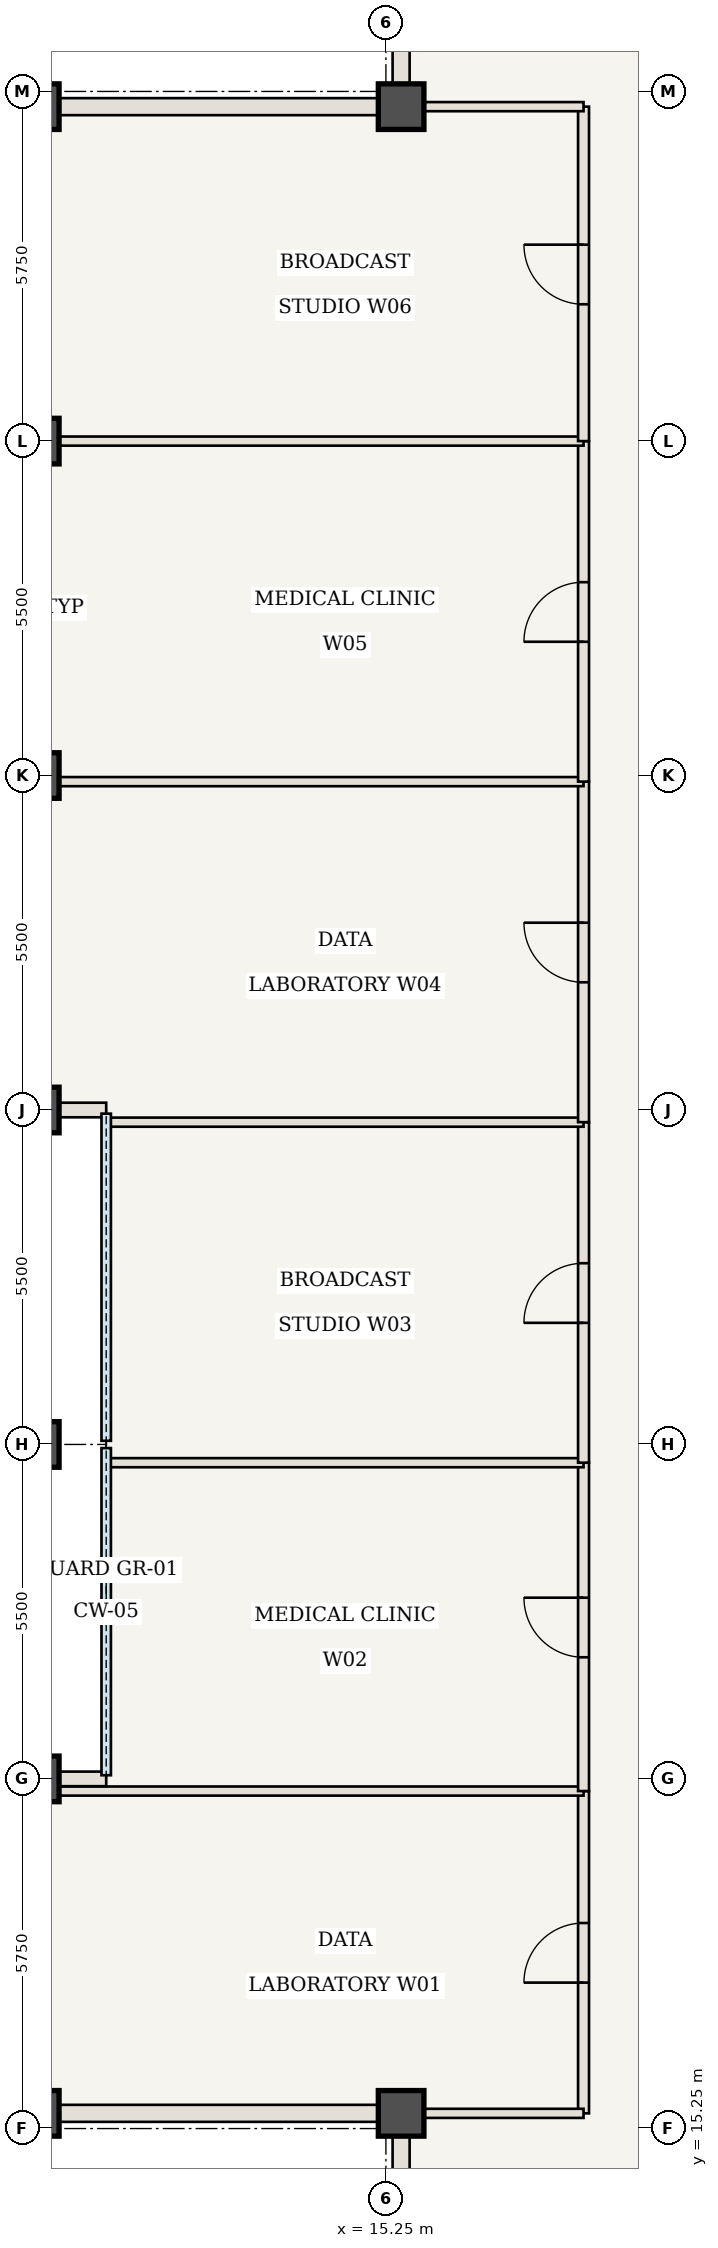
"""IFC4 building model, lengths in metres.
Left out: names, types, materials, properties, quantities, classifications, styles, units other than length and angle.
Written with IfcOpenShell. Run it as: python <this file> out.ifc"""

import sys

from ifc_helpers import new_model, si_unit, direction, frame, frame_2d, origin, origin_2d, place, context, subcontext, project, spatial, rectangle, extrude, element, fill, save


model = new_model("IFC4")
c1 = context("Model", 3, precision=1e-05, world=origin(), true_north=direction((0.0, 1.0)))
c2 = subcontext(c1, "Body", "Model", "MODEL_VIEW")
j1 = project(units=[si_unit("LENGTHUNIT", "METRE"), si_unit("PLANEANGLEUNIT", "RADIAN")], contexts=[c1])
p1 = place(None, origin())
s1 = spatial("IfcSite", under=j1, at=p1, CompositionType="ELEMENT")
p2 = place(p1, origin())
s2 = spatial("IfcBuilding", under=s1, at=p2, CompositionType="ELEMENT")
p3 = place(p2, frame((0.0, 0.0, 296.8)))
s3 = spatial("IfcBuildingStorey", under=s2, at=p3, CompositionType="ELEMENT", Elevation=296.8)
for number, where, z_axis, x_axis in (
    (1, (15.5, 15.5, 0.0), (0.0, 0.0, 1.0), (1.0, 0.0, 0.0)),
    (2, (9.5, 15.5, 0.0), (0.0, 0.0, 1.0), (1.0, 0.0, 0.0)),
    (3, (15.5, 48.5, 0.0), (0.0, 0.0, 1.0), (1.0, 0.0, 0.0)),
    (4, (9.5, 48.5, 0.0), (0.0, 0.0, 1.0), (1.0, 0.0, 0.0)),
    (5, (9.5, 21.0, 0.0), (0.0, 0.0, 1.0), (1.0, 0.0, 0.0)),
    (6, (9.5, 26.5, 0.0), (0.0, 0.0, 1.0), (1.0, 0.0, 0.0)),
    (7, (9.5, 32.0, 0.0), (0.0, 0.0, 1.0), (1.0, 0.0, 0.0)),
    (8, (9.5, 37.5, 0.0), (0.0, 0.0, 1.0), (1.0, 0.0, 0.0)),
    (9, (9.5, 43.0, 0.0), (0.0, 0.0, 1.0), (1.0, 0.0, 0.0)),
):
    element("IfcColumn", number, at=place(p3, frame(where, z_axis=z_axis, x_axis=x_axis)), inside=s3, PredefinedType="COLUMN", context=c2, shape_type="SweptSolid", body=[
        extrude(rectangle(XDim=0.75, YDim=0.75, at=origin_2d()), origin(), (0.0, 0.0, 1.0), 3.85),
    ])
p4 = place(p3, frame((18.5, 15.5, 0.0), z_axis=(0.0, 0.0, 1.0), x_axis=(0.0, 1.0, 0.0)))
e10 = element("IfcWall", 10, at=p4, inside=s3, PredefinedType="STANDARD", context=c2, shape_type="SweptSolid", body=[
    extrude(rectangle(XDim=5.3, YDim=0.18, at=frame_2d((2.65, 0.0))), origin(), (0.0, 0.0, 1.0), 3.685),
])
p5 = place(p4, frame((2.15, 0.0, 0.0)))
e11 = element("IfcOpeningElement", 11, at=p5, cuts=e10, PredefinedType="OPENING", context=c2, shape_type="SweptSolid", body=[
    extrude(rectangle(XDim=0.98, YDim=2.2, at=frame_2d((0.49, 1.1))), frame((0.0, 0.1, 0.0), z_axis=(0.0, -1.0, 0.0), x_axis=(1.0, 0.0, 0.0)), (0.0, 0.0, 1.0), 0.2),
])
p6 = place(p3, frame((9.56, 20.8, 0.0), z_axis=(0.0, 0.0, 1.0), x_axis=(1.0, 0.0, 0.0)))
e12 = element("IfcWall", 12, at=p6, inside=s3, PredefinedType="STANDARD", context=c2, shape_type="SweptSolid", body=[
    extrude(rectangle(XDim=8.94, YDim=0.15, at=frame_2d((4.47, 0.0))), origin(), (0.0, 0.0, 1.0), 3.14),
])
p7 = place(p3, frame((18.5, 20.8, 0.0), z_axis=(0.0, 0.0, 1.0), x_axis=(0.0, 1.0, 0.0)))
e13 = element("IfcWall", 13, at=p7, inside=s3, PredefinedType="STANDARD", context=c2, shape_type="SweptSolid", body=[
    extrude(rectangle(XDim=5.4, YDim=0.18, at=frame_2d((2.7, 0.0))), origin(), (0.0, 0.0, 1.0), 3.685),
])
p8 = place(p7, frame((2.2, 0.0, 0.0)))
e14 = element("IfcOpeningElement", 14, at=p8, cuts=e13, PredefinedType="OPENING", context=c2, shape_type="SweptSolid", body=[
    extrude(rectangle(XDim=0.98, YDim=2.2, at=frame_2d((0.49, 1.1))), frame((0.0, 0.1, 0.0), z_axis=(0.0, -1.0, 0.0), x_axis=(1.0, 0.0, 0.0)), (0.0, 0.0, 1.0), 0.2),
])
p9 = place(p3, frame((10.66, 26.2, 0.0), z_axis=(0.0, 0.0, 1.0), x_axis=(1.0, 0.0, 0.0)))
e15 = element("IfcWall", 15, at=p9, inside=s3, PredefinedType="STANDARD", context=c2, shape_type="SweptSolid", body=[
    extrude(rectangle(XDim=7.84, YDim=0.15, at=frame_2d((3.92, 0.0))), origin(), (0.0, 0.0, 1.0), 3.685),
])
p10 = place(p3, frame((18.5, 26.2, 0.0), z_axis=(0.0, 0.0, 1.0), x_axis=(0.0, 1.0, 0.0)))
e16 = element("IfcWall", 16, at=p10, inside=s3, PredefinedType="STANDARD", context=c2, shape_type="SweptSolid", body=[
    extrude(rectangle(XDim=5.6, YDim=0.18, at=frame_2d((2.8, 0.0))), origin(), (0.0, 0.0, 1.0), 3.685),
])
p11 = place(p10, frame((2.3, 0.0, 0.0)))
e17 = element("IfcOpeningElement", 17, at=p11, cuts=e16, PredefinedType="OPENING", context=c2, shape_type="SweptSolid", body=[
    extrude(rectangle(XDim=0.98, YDim=2.2, at=frame_2d((0.49, 1.1))), frame((0.0, 0.1, 0.0), z_axis=(0.0, -1.0, 0.0), x_axis=(1.0, 0.0, 0.0)), (0.0, 0.0, 1.0), 0.2),
])
p12 = place(p3, frame((10.66, 31.8, 0.0), z_axis=(0.0, 0.0, 1.0), x_axis=(1.0, 0.0, 0.0)))
e18 = element("IfcWall", 18, at=p12, inside=s3, PredefinedType="STANDARD", context=c2, shape_type="SweptSolid", body=[
    extrude(rectangle(XDim=7.84, YDim=0.15, at=frame_2d((3.92, 0.0))), origin(), (0.0, 0.0, 1.0), 3.14),
])
p13 = place(p3, frame((18.5, 31.8, 0.0), z_axis=(0.0, 0.0, 1.0), x_axis=(0.0, 1.0, 0.0)))
e19 = element("IfcWall", 19, at=p13, inside=s3, PredefinedType="STANDARD", context=c2, shape_type="SweptSolid", body=[
    extrude(rectangle(XDim=5.6, YDim=0.18, at=frame_2d((2.8, 0.0))), origin(), (0.0, 0.0, 1.0), 3.685),
])
p14 = place(p13, frame((2.3, 0.0, 0.0)))
e20 = element("IfcOpeningElement", 20, at=p14, cuts=e19, PredefinedType="OPENING", context=c2, shape_type="SweptSolid", body=[
    extrude(rectangle(XDim=0.98, YDim=2.2, at=frame_2d((0.49, 1.1))), frame((0.0, 0.1, 0.0), z_axis=(0.0, -1.0, 0.0), x_axis=(1.0, 0.0, 0.0)), (0.0, 0.0, 1.0), 0.2),
])
p15 = place(p3, frame((9.56, 37.4, 0.0), z_axis=(0.0, 0.0, 1.0), x_axis=(1.0, 0.0, 0.0)))
e21 = element("IfcWall", 21, at=p15, inside=s3, PredefinedType="STANDARD", context=c2, shape_type="SweptSolid", body=[
    extrude(rectangle(XDim=8.94, YDim=0.15, at=frame_2d((4.47, 0.0))), origin(), (0.0, 0.0, 1.0), 3.685),
])
p16 = place(p3, frame((18.5, 37.4, 0.0), z_axis=(0.0, 0.0, 1.0), x_axis=(0.0, 1.0, 0.0)))
e22 = element("IfcWall", 22, at=p16, inside=s3, PredefinedType="STANDARD", context=c2, shape_type="SweptSolid", body=[
    extrude(rectangle(XDim=5.6, YDim=0.18, at=frame_2d((2.8, 0.0))), origin(), (0.0, 0.0, 1.0), 3.685),
])
p17 = place(p16, frame((2.3, 0.0, 0.0)))
e23 = element("IfcOpeningElement", 23, at=p17, cuts=e22, PredefinedType="OPENING", context=c2, shape_type="SweptSolid", body=[
    extrude(rectangle(XDim=0.98, YDim=2.2, at=frame_2d((0.49, 1.1))), frame((0.0, 0.1, 0.0), z_axis=(0.0, -1.0, 0.0), x_axis=(1.0, 0.0, 0.0)), (0.0, 0.0, 1.0), 0.2),
])
p18 = place(p3, frame((9.56, 43.0, 0.0), z_axis=(0.0, 0.0, 1.0), x_axis=(1.0, 0.0, 0.0)))
e24 = element("IfcWall", 24, at=p18, inside=s3, PredefinedType="STANDARD", context=c2, shape_type="SweptSolid", body=[
    extrude(rectangle(XDim=8.94, YDim=0.15, at=frame_2d((4.47, 0.0))), origin(), (0.0, 0.0, 1.0), 3.685),
])
p19 = place(p3, frame((18.5, 43.0, 0.0), z_axis=(0.0, 0.0, 1.0), x_axis=(0.0, 1.0, 0.0)))
e25 = element("IfcWall", 25, at=p19, inside=s3, PredefinedType="STANDARD", context=c2, shape_type="SweptSolid", body=[
    extrude(rectangle(XDim=5.5, YDim=0.18, at=frame_2d((2.75, 0.0))), origin(), (0.0, 0.0, 1.0), 3.685),
])
p20 = place(p19, frame((2.25, 0.0, 0.0)))
e26 = element("IfcOpeningElement", 26, at=p20, cuts=e25, PredefinedType="OPENING", context=c2, shape_type="SweptSolid", body=[
    extrude(rectangle(XDim=0.98, YDim=2.2, at=frame_2d((0.49, 1.1))), frame((0.0, 0.1, 0.0), z_axis=(0.0, -1.0, 0.0), x_axis=(1.0, 0.0, 0.0)), (0.0, 0.0, 1.0), 0.2),
])
for number, where, z_axis, x_axis in (
    (27, (15.5, 15.5, 0.0), (0.0, 0.0, 1.0), (1.0, 0.0, 0.0)),
    (28, (15.5, 48.5, 0.0), (0.0, 0.0, 1.0), (1.0, 0.0, 0.0)),
):
    element("IfcWall", number, at=place(p3, frame(where, z_axis=z_axis, x_axis=x_axis)), inside=s3, PredefinedType="STANDARD", context=c2, shape_type="SweptSolid", body=[
        extrude(rectangle(XDim=3.0, YDim=0.15, at=frame_2d((1.5, 0.0))), origin(), (0.0, 0.0, 1.0), 3.685),
    ])
for number, where, z_axis, x_axis in (
    (29, (9.5, 21.0, 0.0), (0.0, 0.0, 1.0), (1.0, 0.0, 0.0)),
    (30, (9.5, 32.0, 0.0), (0.0, 0.0, 1.0), (1.0, 0.0, 0.0)),
):
    element("IfcWall", number, at=place(p3, frame(where, z_axis=z_axis, x_axis=x_axis)), inside=s3, PredefinedType="USERDEFINED", context=c2, shape_type="SweptSolid", body=[
        extrude(rectangle(XDim=1.15, YDim=0.24, at=frame_2d((0.575, 0.0))), origin(), (0.0, 0.0, 1.0), 2.985),
    ])
for number, where, z_axis, x_axis in (
    (31, (15.5, 9.5, 0.0), (0.0, 0.0, 1.0), (0.0, 1.0, 0.0)),
    (32, (15.5, 15.5, 0.0), (0.0, 0.0, 1.0), (-1.0, 0.0, 0.0)),
    (33, (15.5, 48.5, 0.0), (0.0, 0.0, 1.0), (0.0, 1.0, 0.0)),
    (34, (9.5, 48.5, 0.0), (0.0, 0.0, 1.0), (1.0, 0.0, 0.0)),
):
    element("IfcWall", number, at=place(p3, frame(where, z_axis=z_axis, x_axis=x_axis)), inside=s3, PredefinedType="USERDEFINED", context=c2, shape_type="SweptSolid", body=[
        extrude(rectangle(XDim=6.0, YDim=0.28, at=frame_2d((3.0, 0.0))), origin(), (0.0, 0.0, 1.0), 2.985),
    ])
p21 = place(p5, origin())
e35 = element("IfcDoor", 35, at=p21, inside=s3, OperationType="SINGLE_SWING_LEFT", PredefinedType="DOOR", context=c2, shape_type="SweptSolid", body=[
    extrude(rectangle(XDim=0.98, YDim=2.2, at=frame_2d((0.49, 1.1))), frame((0.0, 0.025, 0.0), z_axis=(0.0, -1.0, 0.0), x_axis=(1.0, 0.0, 0.0)), (0.0, 0.0, 1.0), 0.05),
])
fill(e11, e35)
p22 = place(p8, origin())
e36 = element("IfcDoor", 36, at=p22, inside=s3, OperationType="SINGLE_SWING_RIGHT", PredefinedType="DOOR", context=c2, shape_type="SweptSolid", body=[
    extrude(rectangle(XDim=0.98, YDim=2.2, at=frame_2d((0.49, 1.1))), frame((0.0, 0.025, 0.0), z_axis=(0.0, -1.0, 0.0), x_axis=(1.0, 0.0, 0.0)), (0.0, 0.0, 1.0), 0.05),
])
fill(e14, e36)
p23 = place(p11, origin())
e37 = element("IfcDoor", 37, at=p23, inside=s3, OperationType="SINGLE_SWING_LEFT", PredefinedType="DOOR", context=c2, shape_type="SweptSolid", body=[
    extrude(rectangle(XDim=0.98, YDim=2.2, at=frame_2d((0.49, 1.1))), frame((0.0, 0.025, 0.0), z_axis=(0.0, -1.0, 0.0), x_axis=(1.0, 0.0, 0.0)), (0.0, 0.0, 1.0), 0.05),
])
fill(e17, e37)
p24 = place(p14, origin())
e38 = element("IfcDoor", 38, at=p24, inside=s3, OperationType="SINGLE_SWING_RIGHT", PredefinedType="DOOR", context=c2, shape_type="SweptSolid", body=[
    extrude(rectangle(XDim=0.98, YDim=2.2, at=frame_2d((0.49, 1.1))), frame((0.0, 0.025, 0.0), z_axis=(0.0, -1.0, 0.0), x_axis=(1.0, 0.0, 0.0)), (0.0, 0.0, 1.0), 0.05),
])
fill(e20, e38)
p25 = place(p17, origin())
e39 = element("IfcDoor", 39, at=p25, inside=s3, OperationType="SINGLE_SWING_LEFT", PredefinedType="DOOR", context=c2, shape_type="SweptSolid", body=[
    extrude(rectangle(XDim=0.98, YDim=2.2, at=frame_2d((0.49, 1.1))), frame((0.0, 0.025, 0.0), z_axis=(0.0, -1.0, 0.0), x_axis=(1.0, 0.0, 0.0)), (0.0, 0.0, 1.0), 0.05),
])
fill(e23, e39)
p26 = place(p20, origin())
e40 = element("IfcDoor", 40, at=p26, inside=s3, OperationType="SINGLE_SWING_RIGHT", PredefinedType="DOOR", context=c2, shape_type="SweptSolid", body=[
    extrude(rectangle(XDim=0.98, YDim=2.2, at=frame_2d((0.49, 1.1))), frame((0.0, 0.025, 0.0), z_axis=(0.0, -1.0, 0.0), x_axis=(1.0, 0.0, 0.0)), (0.0, 0.0, 1.0), 0.05),
])
fill(e26, e40)
save(model, sys.argv[1])
